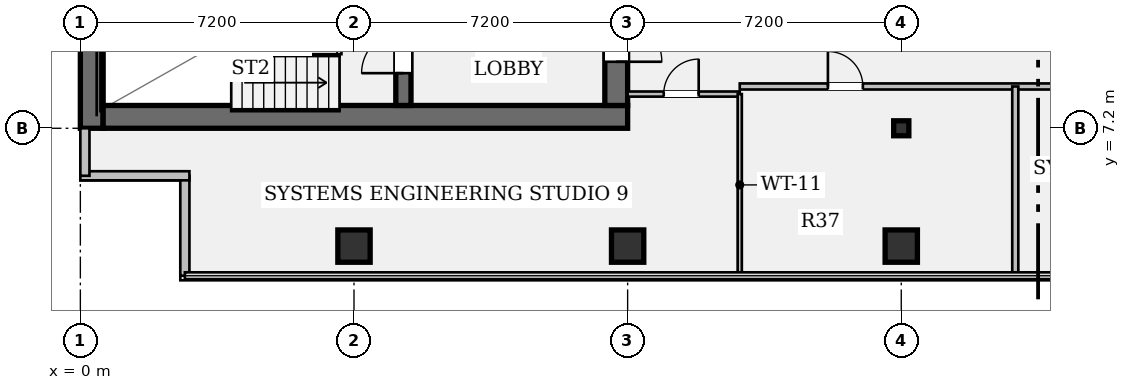
"""IFC4 building model, lengths in metres.
Left out: names, types, materials, properties, quantities, classifications, styles, units other than length and angle.
Written with IfcOpenShell. Run it as: python <this file> out.ifc"""

import sys

from ifc_helpers import new_model, si_unit, direction, frame, frame_2d, origin, origin_2d, place, context, subcontext, project, spatial, rectangle, hollow_rectangle, i_section, extrude, element, fill, save


model = new_model("IFC4")
c1 = context("Model", 3, precision=1e-05, world=origin(), true_north=direction((0.0, 1.0)))
c2 = subcontext(c1, "Body", "Model", "MODEL_VIEW")
j1 = project(units=[si_unit("LENGTHUNIT", "METRE"), si_unit("PLANEANGLEUNIT", "RADIAN")], contexts=[c1])
p1 = place(None, origin())
s1 = spatial("IfcSite", under=j1, at=p1, CompositionType="ELEMENT")
p2 = place(p1, origin())
s2 = spatial("IfcBuilding", under=s1, at=p2, CompositionType="ELEMENT")
p3 = place(p2, frame((0.0, 0.0, 156.1)))
s3 = spatial("IfcBuildingStorey", under=s2, at=p3, CompositionType="ELEMENT", Elevation=156.1)
p4 = place(p3, frame((0.3, 7.2, 0.0), z_axis=(0.0, 0.0, 1.0), x_axis=(0.0, 1.0, 0.0)))
e1 = element("IfcWall", 1, at=p4, inside=s3, PredefinedType="SHEAR", context=c2, shape_type="SweptSolid", body=[
    extrude(rectangle(XDim=28.8, YDim=0.6, at=frame_2d((14.4, 0.0))), origin(), (0.0, 0.0, 1.0), 3.58),
])
p5 = place(p3, frame((0.6, 7.5, 0.0), z_axis=(0.0, 0.0, 1.0), x_axis=(1.0, 0.0, 0.0)))
e2 = element("IfcWall", 2, at=p5, inside=s3, PredefinedType="SHEAR", context=c2, shape_type="SweptSolid", body=[
    extrude(rectangle(XDim=13.8, YDim=0.6, at=frame_2d((6.9, 0.0))), origin(), (0.0, 0.0, 1.0), 3.58),
])
p6 = place(p3, frame((14.1, 35.4, 0.0), z_axis=(0.0, 0.0, 1.0), x_axis=(0.0, -1.0, 0.0)))
e3 = element("IfcWall", 3, at=p6, inside=s3, PredefinedType="SHEAR", context=c2, shape_type="SweptSolid", body=[
    extrude(rectangle(XDim=27.6, YDim=0.6, at=frame_2d((13.8, 0.0))), origin(), (0.0, 0.0, 1.0), 3.58),
])
p7 = place(p6, frame((1.3, 0.0, 0.0)))
e4 = element("IfcOpeningElement", 4, at=p7, cuts=e3, PredefinedType="OPENING", context=c2, shape_type="SweptSolid", body=[
    extrude(rectangle(XDim=1.2, YDim=2.15, at=frame_2d((0.6, 1.075))), frame((0.0, 0.312, 0.0), z_axis=(0.0, -1.0, 0.0), x_axis=(1.0, 0.0, 0.0)), (0.0, 0.0, 1.0), 0.624),
])
p8 = place(p6, frame((25.25, 0.0, 0.0)))
e5 = element("IfcOpeningElement", 5, at=p8, cuts=e3, PredefinedType="OPENING", context=c2, shape_type="SweptSolid", body=[
    extrude(rectangle(XDim=1.2, YDim=2.15, at=frame_2d((0.6, 1.075))), frame((0.0, 0.312, 0.0), z_axis=(0.0, -1.0, 0.0), x_axis=(1.0, 0.0, 0.0)), (0.0, 0.0, 1.0), 0.624),
])
p9 = place(p6, frame((14.6, 0.0, 0.0)))
e6 = element("IfcOpeningElement", 6, at=p9, cuts=e3, PredefinedType="OPENING", context=c2, shape_type="SweptSolid", body=[
    extrude(rectangle(XDim=1.6, YDim=2.2, at=frame_2d((0.8, 1.1))), frame((0.0, 0.312, 0.0), z_axis=(0.0, -1.0, 0.0), x_axis=(1.0, 0.0, 0.0)), (0.0, 0.0, 1.0), 0.624),
])
p10 = place(p3, frame((8.5, 7.8, 0.0), z_axis=(0.0, 0.0, 1.0), x_axis=(0.0, 1.0, 0.0)))
e7 = element("IfcWall", 7, at=p10, inside=s3, PredefinedType="SHEAR", context=c2, shape_type="SweptSolid", body=[
    extrude(rectangle(XDim=3.68, YDim=0.4, at=frame_2d((1.84, 0.0))), origin(), (0.0, 0.0, 1.0), 3.58),
])
p11 = place(p10, frame((0.85, 0.0, 0.0)))
e8 = element("IfcOpeningElement", 8, at=p11, cuts=e7, PredefinedType="OPENING", context=c2, shape_type="SweptSolid", body=[
    extrude(rectangle(XDim=1.1, YDim=2.15, at=frame_2d((0.55, 1.075))), frame((0.0, 0.212, 0.0), z_axis=(0.0, -1.0, 0.0), x_axis=(1.0, 0.0, 0.0)), (0.0, 0.0, 1.0), 0.424),
])
for number, where, z_axis, x_axis in (
    (9, (7.2, 4.1, 0.0), (0.0, 0.0, 1.0), (1.0, 0.0, 0.0)),
    (10, (14.4, 4.1, 0.0), (0.0, 0.0, 1.0), (1.0, 0.0, 0.0)),
    (11, (21.6, 4.1, 0.0), (0.0, 0.0, 1.0), (1.0, 0.0, 0.0)),
):
    element("IfcColumn", number, at=place(p3, frame(where, z_axis=z_axis, x_axis=x_axis)), inside=s3, PredefinedType="COLUMN", context=c2, shape_type="SweptSolid", body=[
        extrude(hollow_rectangle(XDim=0.85, YDim=0.85, WallThickness=0.05, at=origin_2d()), origin(), (0.0, 0.0, 1.0), 3.58),
    ])
p12 = place(p3, frame((21.6, 7.2, 0.0), z_axis=(0.0, 0.0, 1.0), x_axis=(1.0, 0.0, 0.0)))
e12 = element("IfcColumn", 12, at=p12, inside=s3, PredefinedType="COLUMN", context=c2, shape_type="SweptSolid", body=[
    extrude(i_section(OverallWidth=0.399, OverallDepth=0.394, WebThickness=0.023, FlangeThickness=0.037, FilletRadius=0.018, at=origin_2d()), origin(), (0.0, 0.0, 1.0), 3.58),
])
p13 = place(p3, frame((2.75, 3.32, 0.0), z_axis=(0.0, 0.0, 1.0), x_axis=(0.0, 1.0, 0.0)))
e13 = element("IfcWall", 13, at=p13, inside=s3, PredefinedType="STANDARD", context=c2, shape_type="SweptSolid", body=[
    extrude(rectangle(XDim=2.63, YDim=0.24, at=frame_2d((1.315, 0.0))), origin(), (0.0, 0.0, 1.0), 3.58),
])
p14 = place(p3, frame((2.87, 5.95, 0.0), z_axis=(0.0, 0.0, 1.0), x_axis=(-1.0, 0.0, 0.0)))
e14 = element("IfcWall", 14, at=p14, inside=s3, PredefinedType="STANDARD", context=c2, shape_type="SweptSolid", body=[
    extrude(rectangle(XDim=2.87, YDim=0.24, at=frame_2d((1.435, 0.0))), origin(), (0.0, 0.0, 1.0), 3.58),
])
p15 = place(p3, frame((0.12, 5.95, 0.0), z_axis=(0.0, 0.0, 1.0), x_axis=(0.0, 1.0, 0.0)))
e15 = element("IfcWall", 15, at=p15, inside=s3, PredefinedType="STANDARD", context=c2, shape_type="SweptSolid", body=[
    extrude(rectangle(XDim=1.25, YDim=0.24, at=frame_2d((0.625, 0.0))), origin(), (0.0, 0.0, 1.0), 3.58),
])
p16 = place(p3, frame((14.4, 8.1, 0.0), z_axis=(0.0, 0.0, 1.0), x_axis=(1.0, 0.0, 0.0)))
e16 = element("IfcWall", 16, at=p16, inside=s3, PredefinedType="PARTITIONING", context=c2, shape_type="SweptSolid", body=[
    extrude(rectangle(XDim=2.95, YDim=0.135, at=frame_2d((1.475, 0.0))), origin(), (0.0, 0.0, 1.0), 3.148),
])
p17 = place(p16, frame((0.95, 0.0, 0.0)))
e17 = element("IfcOpeningElement", 17, at=p17, cuts=e16, PredefinedType="OPENING", context=c2, shape_type="SweptSolid", body=[
    extrude(rectangle(XDim=0.92, YDim=2.15, at=frame_2d((0.46, 1.075))), frame((0.0, 0.08, 0.0), z_axis=(0.0, -1.0, 0.0), x_axis=(1.0, 0.0, 0.0)), (0.0, 0.0, 1.0), 0.159),
])
p18 = place(p3, frame((17.35, 8.3, 0.0), z_axis=(0.0, 0.0, 1.0), x_axis=(1.0, 0.0, 0.0)))
e18 = element("IfcWall", 18, at=p18, inside=s3, PredefinedType="PARTITIONING", context=c2, shape_type="SweptSolid", body=[
    extrude(rectangle(XDim=21.15, YDim=0.16, at=frame_2d((10.575, 0.0))), origin(), (0.0, 0.0, 1.0), 2.869),
])
p19 = place(p18, frame((2.32, 0.0, 0.0)))
e19 = element("IfcOpeningElement", 19, at=p19, cuts=e18, PredefinedType="OPENING", context=c2, shape_type="SweptSolid", body=[
    extrude(rectangle(XDim=0.92, YDim=2.15, at=frame_2d((0.46, 1.075))), frame((0.0, 0.092, 0.0), z_axis=(0.0, -1.0, 0.0), x_axis=(1.0, 0.0, 0.0)), (0.0, 0.0, 1.0), 0.184),
])
p20 = place(p18, frame((9.85, 0.0, 0.0)))
e20 = element("IfcOpeningElement", 20, at=p20, cuts=e18, PredefinedType="OPENING", context=c2, shape_type="SweptSolid", body=[
    extrude(rectangle(XDim=0.92, YDim=2.15, at=frame_2d((0.46, 1.075))), frame((0.0, 0.092, 0.0), z_axis=(0.0, -1.0, 0.0), x_axis=(1.0, 0.0, 0.0)), (0.0, 0.0, 1.0), 0.184),
])
p21 = place(p18, frame((16.8, 0.0, 0.0)))
e21 = element("IfcOpeningElement", 21, at=p21, cuts=e18, PredefinedType="OPENING", context=c2, shape_type="SweptSolid", body=[
    extrude(rectangle(XDim=0.92, YDim=2.15, at=frame_2d((0.46, 1.075))), frame((0.0, 0.092, 0.0), z_axis=(0.0, -1.0, 0.0), x_axis=(1.0, 0.0, 0.0)), (0.0, 0.0, 1.0), 0.184),
])
p22 = place(p3, frame((17.35, 3.32, 0.0), z_axis=(0.0, 0.0, 1.0), x_axis=(0.0, 1.0, 0.0)))
e22 = element("IfcWall", 22, at=p22, inside=s3, PredefinedType="PARTITIONING", context=c2, shape_type="SweptSolid", body=[
    extrude(rectangle(XDim=4.78, YDim=0.11, at=frame_2d((2.39, 0.0))), origin(), (0.0, 0.0, 1.0), 2.869),
])
p23 = place(p3, frame((24.6, 3.32, 0.0), z_axis=(0.0, 0.0, 1.0), x_axis=(0.0, 1.0, 0.0)))
e23 = element("IfcWall", 23, at=p23, inside=s3, PredefinedType="PARTITIONING", context=c2, shape_type="SweptSolid", body=[
    extrude(rectangle(XDim=4.98, YDim=0.16, at=frame_2d((2.49, 0.0))), origin(), (0.0, 0.0, 1.0), 2.869),
])
p24 = place(p11, origin())
e24 = element("IfcDoor", 24, at=p24, inside=s3, OperationType="SINGLE_SWING_LEFT", PredefinedType="DOOR", context=c2, shape_type="SweptSolid", body=[
    extrude(rectangle(XDim=1.1, YDim=2.15, at=frame_2d((0.55, 1.075))), frame((0.0, 0.025, 0.0), z_axis=(0.0, -1.0, 0.0), x_axis=(1.0, 0.0, 0.0)), (0.0, 0.0, 1.0), 0.05),
])
fill(e8, e24)
p25 = place(p8, origin())
e25 = element("IfcDoor", 25, at=p25, inside=s3, OperationType="SINGLE_SWING_RIGHT", PredefinedType="DOOR", context=c2, shape_type="SweptSolid", body=[
    extrude(rectangle(XDim=1.2, YDim=2.15, at=frame_2d((0.6, 1.075))), frame((0.0, 0.025, 0.0), z_axis=(0.0, -1.0, 0.0), x_axis=(1.0, 0.0, 0.0)), (0.0, 0.0, 1.0), 0.05),
])
fill(e5, e25)
p26 = place(p17, origin())
e26 = element("IfcDoor", 26, at=p26, inside=s3, OperationType="SINGLE_SWING_RIGHT", PredefinedType="DOOR", context=c2, shape_type="SweptSolid", body=[
    extrude(rectangle(XDim=0.92, YDim=2.15, at=frame_2d((0.46, 1.075))), frame((0.0, 0.025, 0.0), z_axis=(0.0, -1.0, 0.0), x_axis=(1.0, 0.0, 0.0)), (0.0, 0.0, 1.0), 0.05),
])
fill(e17, e26)
p27 = place(p19, origin())
e27 = element("IfcDoor", 27, at=p27, inside=s3, OperationType="SINGLE_SWING_LEFT", PredefinedType="DOOR", context=c2, shape_type="SweptSolid", body=[
    extrude(rectangle(XDim=0.92, YDim=2.15, at=frame_2d((0.46, 1.075))), frame((0.0, 0.025, 0.0), z_axis=(0.0, -1.0, 0.0), x_axis=(1.0, 0.0, 0.0)), (0.0, 0.0, 1.0), 0.05),
])
fill(e19, e27)
save(model, sys.argv[1])
